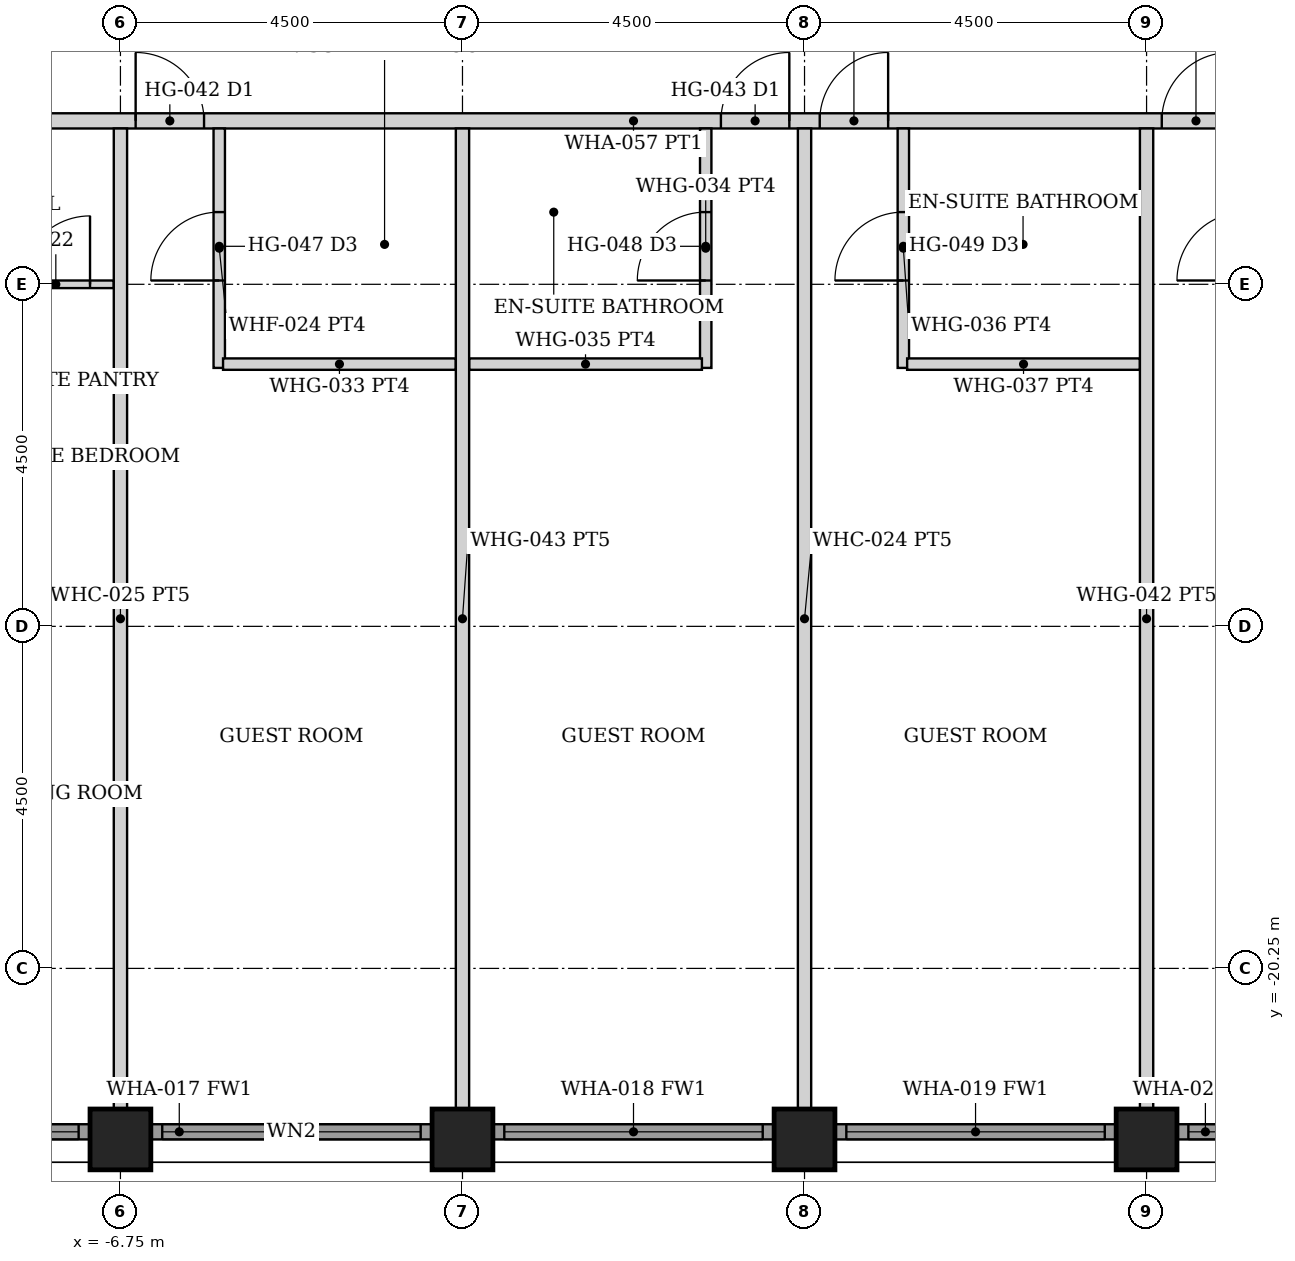
"""IFC4 building model, lengths in metres.
Left out: names, types, materials, properties, quantities, classifications, styles, units other than length and angle.
Written with IfcOpenShell. Run it as: python <this file> out.ifc"""

import sys

from ifc_helpers import new_model, si_unit, direction, frame, frame_2d, origin, origin_2d, place, context, subcontext, project, spatial, rectangle, hollow_rectangle, extrude, element, fill, save


model = new_model("IFC4")
c1 = context("Model", 3, precision=1e-05, world=origin(), true_north=direction((0.0, 1.0)))
c2 = subcontext(c1, "Body", "Model", "MODEL_VIEW")
j1 = project(units=[si_unit("LENGTHUNIT", "METRE"), si_unit("PLANEANGLEUNIT", "RADIAN")], contexts=[c1])
p1 = place(None, origin())
s1 = spatial("IfcSite", under=j1, at=p1, CompositionType="ELEMENT")
p2 = place(p1, origin())
s2 = spatial("IfcBuilding", under=s1, at=p2, CompositionType="ELEMENT")
p3 = place(p2, frame((0.0, 0.0, 183.2)))
s3 = spatial("IfcBuildingStorey", under=s2, at=p3, CompositionType="ELEMENT", Elevation=183.2)
for number, where, z_axis, x_axis in (
    (1, (-6.75, -22.5, 0.0), (0.0, 0.0, 1.0), (0.0, 1.0, 0.0)),
    (2, (-2.25, -22.5, 0.0), (0.0, 0.0, 1.0), (0.0, 1.0, 0.0)),
    (3, (2.25, -22.5, 0.0), (0.0, 0.0, 1.0), (0.0, 1.0, 0.0)),
    (4, (6.75, -22.5, 0.0), (0.0, 0.0, 1.0), (0.0, 1.0, 0.0)),
):
    element("IfcColumn", number, at=place(p3, frame(where, z_axis=z_axis, x_axis=x_axis)), inside=s3, PredefinedType="COLUMN", context=c2, shape_type="SweptSolid", body=[
        extrude(hollow_rectangle(XDim=0.8, YDim=0.8, WallThickness=0.045, at=origin_2d()), origin(), (0.0, 0.0, 1.0), 3.6),
    ])
p4 = place(p3, frame((-10.845, -22.4, 0.0), z_axis=(0.0, 0.0, 1.0), x_axis=(1.0, 0.0, 0.0)))
e5 = element("IfcWall", 5, at=p4, inside=s3, PredefinedType="SOLIDWALL", context=c2, shape_type="SweptSolid", body=[
    extrude(rectangle(XDim=3.69, YDim=0.2, at=frame_2d((1.845, 0.0))), origin(), (0.0, 0.0, 1.0), 2.479),
])
p5 = place(p4, frame((0.145, 0.0, 0.3)))
e6 = element("IfcOpeningElement", 6, at=p5, cuts=e5, PredefinedType="OPENING", context=c2, shape_type="SweptSolid", body=[
    extrude(rectangle(XDim=3.4, YDim=2.029, at=frame_2d((1.7, 1.015))), frame((0.0, 0.11, 0.0), z_axis=(0.0, -1.0, 0.0), x_axis=(1.0, 0.0, 0.0)), (0.0, 0.0, 1.0), 0.22),
])
p6 = place(p3, frame((-6.345, -22.4, 0.0), z_axis=(0.0, 0.0, 1.0), x_axis=(1.0, 0.0, 0.0)))
e7 = element("IfcWall", 7, at=p6, inside=s3, PredefinedType="SOLIDWALL", context=c2, shape_type="SweptSolid", body=[
    extrude(rectangle(XDim=3.69, YDim=0.2, at=frame_2d((1.845, 0.0))), origin(), (0.0, 0.0, 1.0), 2.479),
])
p7 = place(p6, frame((0.145, 0.0, 0.3)))
e8 = element("IfcOpeningElement", 8, at=p7, cuts=e7, PredefinedType="OPENING", context=c2, shape_type="SweptSolid", body=[
    extrude(rectangle(XDim=3.4, YDim=2.029, at=frame_2d((1.7, 1.015))), frame((0.0, 0.11, 0.0), z_axis=(0.0, -1.0, 0.0), x_axis=(1.0, 0.0, 0.0)), (0.0, 0.0, 1.0), 0.22),
])
p8 = place(p3, frame((-1.845, -22.4, 0.0), z_axis=(0.0, 0.0, 1.0), x_axis=(1.0, 0.0, 0.0)))
e9 = element("IfcWall", 9, at=p8, inside=s3, PredefinedType="SOLIDWALL", context=c2, shape_type="SweptSolid", body=[
    extrude(rectangle(XDim=3.69, YDim=0.2, at=frame_2d((1.845, 0.0))), origin(), (0.0, 0.0, 1.0), 2.479),
])
p9 = place(p8, frame((0.145, 0.0, 0.3)))
e10 = element("IfcOpeningElement", 10, at=p9, cuts=e9, PredefinedType="OPENING", context=c2, shape_type="SweptSolid", body=[
    extrude(rectangle(XDim=3.4, YDim=2.029, at=frame_2d((1.7, 1.015))), frame((0.0, 0.11, 0.0), z_axis=(0.0, -1.0, 0.0), x_axis=(1.0, 0.0, 0.0)), (0.0, 0.0, 1.0), 0.22),
])
p10 = place(p3, frame((2.655, -22.4, 0.0), z_axis=(0.0, 0.0, 1.0), x_axis=(1.0, 0.0, 0.0)))
e11 = element("IfcWall", 11, at=p10, inside=s3, PredefinedType="SOLIDWALL", context=c2, shape_type="SweptSolid", body=[
    extrude(rectangle(XDim=3.69, YDim=0.2, at=frame_2d((1.845, 0.0))), origin(), (0.0, 0.0, 1.0), 2.479),
])
p11 = place(p10, frame((0.145, 0.0, 0.3)))
e12 = element("IfcOpeningElement", 12, at=p11, cuts=e11, PredefinedType="OPENING", context=c2, shape_type="SweptSolid", body=[
    extrude(rectangle(XDim=3.4, YDim=2.029, at=frame_2d((1.7, 1.015))), frame((0.0, 0.11, 0.0), z_axis=(0.0, -1.0, 0.0), x_axis=(1.0, 0.0, 0.0)), (0.0, 0.0, 1.0), 0.22),
])
p12 = place(p3, frame((7.155, -22.4, 0.0), z_axis=(0.0, 0.0, 1.0), x_axis=(1.0, 0.0, 0.0)))
e13 = element("IfcWall", 13, at=p12, inside=s3, PredefinedType="SOLIDWALL", context=c2, shape_type="SweptSolid", body=[
    extrude(rectangle(XDim=3.69, YDim=0.2, at=frame_2d((1.845, 0.0))), origin(), (0.0, 0.0, 1.0), 2.479),
])
p13 = place(p12, frame((0.145, 0.0, 0.3)))
e14 = element("IfcOpeningElement", 14, at=p13, cuts=e13, PredefinedType="OPENING", context=c2, shape_type="SweptSolid", body=[
    extrude(rectangle(XDim=3.4, YDim=2.029, at=frame_2d((1.7, 1.015))), frame((0.0, 0.11, 0.0), z_axis=(0.0, -1.0, 0.0), x_axis=(1.0, 0.0, 0.0)), (0.0, 0.0, 1.0), 0.22),
])
p14 = place(p3, frame((-22.3, -9.1, 0.0), z_axis=(0.0, 0.0, 1.0), x_axis=(1.0, 0.0, 0.0)))
e15 = element("IfcWall", 15, at=p14, inside=s3, PredefinedType="PARTITIONING", context=c2, shape_type="SweptSolid", body=[
    extrude(rectangle(XDim=44.6, YDim=0.2, at=frame_2d((22.3, 0.0))), origin(), (0.0, 0.0, 1.0), 2.473),
])
p15 = place(p14, frame((11.35, 0.0, 0.0)))
e16 = element("IfcOpeningElement", 16, at=p15, cuts=e15, PredefinedType="OPENING", context=c2, shape_type="SweptSolid", body=[
    extrude(rectangle(XDim=0.9, YDim=2.1, at=frame_2d((0.45, 1.05))), frame((0.0, 0.11, 0.0), z_axis=(0.0, -1.0, 0.0), x_axis=(1.0, 0.0, 0.0)), (0.0, 0.0, 1.0), 0.22),
])
p16 = place(p14, frame((15.75, 0.0, 0.0)))
e17 = element("IfcOpeningElement", 17, at=p16, cuts=e15, PredefinedType="OPENING", context=c2, shape_type="SweptSolid", body=[
    extrude(rectangle(XDim=0.9, YDim=2.1, at=frame_2d((0.45, 1.05))), frame((0.0, 0.11, 0.0), z_axis=(0.0, -1.0, 0.0), x_axis=(1.0, 0.0, 0.0)), (0.0, 0.0, 1.0), 0.22),
])
p17 = place(p14, frame((23.45, 0.0, 0.0)))
e18 = element("IfcOpeningElement", 18, at=p17, cuts=e15, PredefinedType="OPENING", context=c2, shape_type="SweptSolid", body=[
    extrude(rectangle(XDim=0.9, YDim=2.1, at=frame_2d((0.45, 1.05))), frame((0.0, 0.11, 0.0), z_axis=(0.0, -1.0, 0.0), x_axis=(1.0, 0.0, 0.0)), (0.0, 0.0, 1.0), 0.22),
])
p18 = place(p14, frame((24.75, 0.0, 0.0)))
e19 = element("IfcOpeningElement", 19, at=p18, cuts=e15, PredefinedType="OPENING", context=c2, shape_type="SweptSolid", body=[
    extrude(rectangle(XDim=0.9, YDim=2.1, at=frame_2d((0.45, 1.05))), frame((0.0, 0.11, 0.0), z_axis=(0.0, -1.0, 0.0), x_axis=(1.0, 0.0, 0.0)), (0.0, 0.0, 1.0), 0.22),
])
p19 = place(p14, frame((29.25, 0.0, 0.0)))
e20 = element("IfcOpeningElement", 20, at=p19, cuts=e15, PredefinedType="OPENING", context=c2, shape_type="SweptSolid", body=[
    extrude(rectangle(XDim=0.9, YDim=2.1, at=frame_2d((0.45, 1.05))), frame((0.0, 0.11, 0.0), z_axis=(0.0, -1.0, 0.0), x_axis=(1.0, 0.0, 0.0)), (0.0, 0.0, 1.0), 0.22),
])
p20 = place(p14, frame((38.85, 0.0, 0.0)))
e21 = element("IfcOpeningElement", 21, at=p20, cuts=e15, PredefinedType="OPENING", context=c2, shape_type="SweptSolid", body=[
    extrude(rectangle(XDim=0.9, YDim=2.1, at=frame_2d((0.45, 1.05))), frame((0.0, 0.11, 0.0), z_axis=(0.0, -1.0, 0.0), x_axis=(1.0, 0.0, 0.0)), (0.0, 0.0, 1.0), 0.22),
])
p21 = place(p14, frame((4.85, 0.0, 0.0)))
e22 = element("IfcOpeningElement", 22, at=p21, cuts=e15, PredefinedType="OPENING", context=c2, shape_type="SweptSolid", body=[
    extrude(rectangle(XDim=0.9, YDim=2.1, at=frame_2d((0.45, 1.05))), frame((0.0, 0.11, 0.0), z_axis=(0.0, -1.0, 0.0), x_axis=(1.0, 0.0, 0.0)), (0.0, 0.0, 1.0), 0.22),
])
p22 = place(p3, frame((-15.663, -11.25, 0.0), z_axis=(0.0, 0.0, 1.0), x_axis=(1.0, 0.0, 0.0)))
e23 = element("IfcWall", 23, at=p22, inside=s3, PredefinedType="PARTITIONING", context=c2, shape_type="SweptSolid", body=[
    extrude(rectangle(XDim=8.825, YDim=0.1, at=frame_2d((4.413, 0.0))), origin(), (0.0, 0.0, 1.0), 2.473),
])
p23 = place(p22, frame((5.363, 0.0, 0.0)))
e24 = element("IfcOpeningElement", 24, at=p23, cuts=e23, PredefinedType="OPENING", context=c2, shape_type="SweptSolid", body=[
    extrude(rectangle(XDim=0.9, YDim=2.1, at=frame_2d((0.45, 1.05))), frame((0.0, 0.06, 0.0), z_axis=(0.0, -1.0, 0.0), x_axis=(1.0, 0.0, 0.0)), (0.0, 0.0, 1.0), 0.12),
])
p24 = place(p22, frame((7.613, 0.0, 0.0)))
e25 = element("IfcOpeningElement", 25, at=p24, cuts=e23, PredefinedType="OPENING", context=c2, shape_type="SweptSolid", body=[
    extrude(rectangle(XDim=0.9, YDim=2.1, at=frame_2d((0.45, 1.05))), frame((0.0, 0.06, 0.0), z_axis=(0.0, -1.0, 0.0), x_axis=(1.0, 0.0, 0.0)), (0.0, 0.0, 1.0), 0.12),
])
p25 = place(p22, frame((3.337, 0.0, 0.0)))
e26 = element("IfcOpeningElement", 26, at=p25, cuts=e23, PredefinedType="OPENING", context=c2, shape_type="SweptSolid", body=[
    extrude(rectangle(XDim=0.85, YDim=2.1, at=frame_2d((0.425, 1.05))), frame((0.0, 0.06, 0.0), z_axis=(0.0, -1.0, 0.0), x_axis=(1.0, 0.0, 0.0)), (0.0, 0.0, 1.0), 0.12),
])
p26 = place(p3, frame((-5.45, -12.35, 0.0), z_axis=(0.0, 0.0, 1.0), x_axis=(0.0, 1.0, 0.0)))
e27 = element("IfcWall", 27, at=p26, inside=s3, PredefinedType="PARTITIONING", context=c2, shape_type="SweptSolid", body=[
    extrude(rectangle(XDim=3.15, YDim=0.15, at=frame_2d((1.575, 0.0))), origin(), (0.0, 0.0, 1.0), 2.473),
])
p27 = place(p26, frame((1.15, 0.0, 0.0)))
e28 = element("IfcOpeningElement", 28, at=p27, cuts=e27, PredefinedType="OPENING", context=c2, shape_type="SweptSolid", body=[
    extrude(rectangle(XDim=0.9, YDim=2.1, at=frame_2d((0.45, 1.05))), frame((0.0, 0.085, 0.0), z_axis=(0.0, -1.0, 0.0), x_axis=(1.0, 0.0, 0.0)), (0.0, 0.0, 1.0), 0.17),
])
p28 = place(p3, frame((-5.4, -12.3, 0.0), z_axis=(0.0, 0.0, 1.0), x_axis=(1.0, 0.0, 0.0)))
e29 = element("IfcWall", 29, at=p28, inside=s3, PredefinedType="PARTITIONING", context=c2, shape_type="SweptSolid", body=[
    extrude(rectangle(XDim=3.062, YDim=0.15, at=frame_2d((1.531, 0.0))), origin(), (0.0, 0.0, 1.0), 2.473),
])
p29 = place(p3, frame((0.95, -12.35, 0.0), z_axis=(0.0, 0.0, 1.0), x_axis=(0.0, 1.0, 0.0)))
e30 = element("IfcWall", 30, at=p29, inside=s3, PredefinedType="PARTITIONING", context=c2, shape_type="SweptSolid", body=[
    extrude(rectangle(XDim=3.15, YDim=0.15, at=frame_2d((1.575, 0.0))), origin(), (0.0, 0.0, 1.0), 2.473),
])
p30 = place(p29, frame((1.15, 0.0, 0.0)))
e31 = element("IfcOpeningElement", 31, at=p30, cuts=e30, PredefinedType="OPENING", context=c2, shape_type="SweptSolid", body=[
    extrude(rectangle(XDim=0.9, YDim=2.1, at=frame_2d((0.45, 1.05))), frame((0.0, 0.085, 0.0), z_axis=(0.0, -1.0, 0.0), x_axis=(1.0, 0.0, 0.0)), (0.0, 0.0, 1.0), 0.17),
])
p31 = place(p3, frame((-2.163, -12.3, 0.0), z_axis=(0.0, 0.0, 1.0), x_axis=(1.0, 0.0, 0.0)))
e32 = element("IfcWall", 32, at=p31, inside=s3, PredefinedType="PARTITIONING", context=c2, shape_type="SweptSolid", body=[
    extrude(rectangle(XDim=3.062, YDim=0.15, at=frame_2d((1.531, 0.0))), origin(), (0.0, 0.0, 1.0), 2.473),
])
p32 = place(p3, frame((3.55, -12.35, 0.0), z_axis=(0.0, 0.0, 1.0), x_axis=(0.0, 1.0, 0.0)))
e33 = element("IfcWall", 33, at=p32, inside=s3, PredefinedType="PARTITIONING", context=c2, shape_type="SweptSolid", body=[
    extrude(rectangle(XDim=3.15, YDim=0.15, at=frame_2d((1.575, 0.0))), origin(), (0.0, 0.0, 1.0), 2.473),
])
p33 = place(p32, frame((1.15, 0.0, 0.0)))
e34 = element("IfcOpeningElement", 34, at=p33, cuts=e33, PredefinedType="OPENING", context=c2, shape_type="SweptSolid", body=[
    extrude(rectangle(XDim=0.9, YDim=2.1, at=frame_2d((0.45, 1.05))), frame((0.0, 0.085, 0.0), z_axis=(0.0, -1.0, 0.0), x_axis=(1.0, 0.0, 0.0)), (0.0, 0.0, 1.0), 0.17),
])
p34 = place(p3, frame((3.6, -12.3, 0.0), z_axis=(0.0, 0.0, 1.0), x_axis=(1.0, 0.0, 0.0)))
e35 = element("IfcWall", 35, at=p34, inside=s3, PredefinedType="PARTITIONING", context=c2, shape_type="SweptSolid", body=[
    extrude(rectangle(XDim=3.062, YDim=0.15, at=frame_2d((1.531, 0.0))), origin(), (0.0, 0.0, 1.0), 2.473),
])
for number, where, z_axis, x_axis in (
    (36, (-6.75, -22.1, 0.0), (0.0, 0.0, 1.0), (0.0, 1.0, 0.0)),
    (37, (-2.25, -22.1, 0.0), (0.0, 0.0, 1.0), (0.0, 1.0, 0.0)),
    (38, (2.25, -22.1, 0.0), (0.0, 0.0, 1.0), (0.0, 1.0, 0.0)),
    (39, (6.75, -22.1, 0.0), (0.0, 0.0, 1.0), (0.0, 1.0, 0.0)),
):
    element("IfcWall", number, at=place(p3, frame(where, z_axis=z_axis, x_axis=x_axis)), inside=s3, PredefinedType="PARTITIONING", context=c2, shape_type="SweptSolid", body=[
        extrude(rectangle(XDim=12.9, YDim=0.175, at=frame_2d((6.45, 0.0))), origin(), (0.0, 0.0, 1.0), 2.473),
    ])
p35 = place(p5, origin())
e40 = element("IfcWindow", 40, at=p35, inside=s3, PartitioningType="SINGLE_PANEL", PredefinedType="WINDOW", context=c2, shape_type="SweptSolid", body=[
    extrude(rectangle(XDim=3.4, YDim=2.029, at=frame_2d((1.7, 1.015))), frame((0.0, 0.03, 0.0), z_axis=(0.0, -1.0, 0.0), x_axis=(1.0, 0.0, 0.0)), (0.0, 0.0, 1.0), 0.06),
])
fill(e6, e40)
p36 = place(p7, origin())
e41 = element("IfcWindow", 41, at=p36, inside=s3, PartitioningType="SINGLE_PANEL", PredefinedType="WINDOW", context=c2, shape_type="SweptSolid", body=[
    extrude(rectangle(XDim=3.4, YDim=2.029, at=frame_2d((1.7, 1.015))), frame((0.0, 0.03, 0.0), z_axis=(0.0, -1.0, 0.0), x_axis=(1.0, 0.0, 0.0)), (0.0, 0.0, 1.0), 0.06),
])
fill(e8, e41)
p37 = place(p9, origin())
e42 = element("IfcWindow", 42, at=p37, inside=s3, PartitioningType="SINGLE_PANEL", PredefinedType="WINDOW", context=c2, shape_type="SweptSolid", body=[
    extrude(rectangle(XDim=3.4, YDim=2.029, at=frame_2d((1.7, 1.015))), frame((0.0, 0.03, 0.0), z_axis=(0.0, -1.0, 0.0), x_axis=(1.0, 0.0, 0.0)), (0.0, 0.0, 1.0), 0.06),
])
fill(e10, e42)
p38 = place(p11, origin())
e43 = element("IfcWindow", 43, at=p38, inside=s3, PartitioningType="SINGLE_PANEL", PredefinedType="WINDOW", context=c2, shape_type="SweptSolid", body=[
    extrude(rectangle(XDim=3.4, YDim=2.029, at=frame_2d((1.7, 1.015))), frame((0.0, 0.03, 0.0), z_axis=(0.0, -1.0, 0.0), x_axis=(1.0, 0.0, 0.0)), (0.0, 0.0, 1.0), 0.06),
])
fill(e12, e43)
p39 = place(p13, origin())
e44 = element("IfcWindow", 44, at=p39, inside=s3, PartitioningType="SINGLE_PANEL", PredefinedType="WINDOW", context=c2, shape_type="SweptSolid", body=[
    extrude(rectangle(XDim=3.4, YDim=2.029, at=frame_2d((1.7, 1.015))), frame((0.0, 0.03, 0.0), z_axis=(0.0, -1.0, 0.0), x_axis=(1.0, 0.0, 0.0)), (0.0, 0.0, 1.0), 0.06),
])
fill(e14, e44)
p40 = place(p24, origin())
e45 = element("IfcDoor", 45, at=p40, inside=s3, OperationType="SINGLE_SWING_RIGHT", PredefinedType="DOOR", context=c2, shape_type="SweptSolid", body=[
    extrude(rectangle(XDim=0.9, YDim=2.1, at=frame_2d((0.45, 1.05))), frame((0.0, 0.025, 0.0), z_axis=(0.0, -1.0, 0.0), x_axis=(1.0, 0.0, 0.0)), (0.0, 0.0, 1.0), 0.05),
])
fill(e25, e45)
p41 = place(p16, origin())
e46 = element("IfcDoor", 46, at=p41, inside=s3, OperationType="SINGLE_SWING_LEFT", PredefinedType="DOOR", context=c2, shape_type="SweptSolid", body=[
    extrude(rectangle(XDim=0.9, YDim=2.1, at=frame_2d((0.45, 1.05))), frame((0.0, 0.025, 0.0), z_axis=(0.0, -1.0, 0.0), x_axis=(1.0, 0.0, 0.0)), (0.0, 0.0, 1.0), 0.05),
])
fill(e17, e46)
p42 = place(p27, origin())
e47 = element("IfcDoor", 47, at=p42, inside=s3, OperationType="SINGLE_SWING_LEFT", PredefinedType="DOOR", context=c2, shape_type="SweptSolid", body=[
    extrude(rectangle(XDim=0.9, YDim=2.1, at=frame_2d((0.45, 1.05))), frame((0.0, 0.025, 0.0), z_axis=(0.0, -1.0, 0.0), x_axis=(1.0, 0.0, 0.0)), (0.0, 0.0, 1.0), 0.05),
])
fill(e28, e47)
p43 = place(p17, origin())
e48 = element("IfcDoor", 48, at=p43, inside=s3, OperationType="SINGLE_SWING_RIGHT", PredefinedType="DOOR", context=c2, shape_type="SweptSolid", body=[
    extrude(rectangle(XDim=0.9, YDim=2.1, at=frame_2d((0.45, 1.05))), frame((0.0, 0.025, 0.0), z_axis=(0.0, -1.0, 0.0), x_axis=(1.0, 0.0, 0.0)), (0.0, 0.0, 1.0), 0.05),
])
fill(e18, e48)
p44 = place(p30, origin())
e49 = element("IfcDoor", 49, at=p44, inside=s3, OperationType="SINGLE_SWING_LEFT", PredefinedType="DOOR", context=c2, shape_type="SweptSolid", body=[
    extrude(rectangle(XDim=0.9, YDim=2.1, at=frame_2d((0.45, 1.05))), frame((0.0, 0.025, 0.0), z_axis=(0.0, -1.0, 0.0), x_axis=(1.0, 0.0, 0.0)), (0.0, 0.0, 1.0), 0.05),
])
fill(e31, e49)
p45 = place(p18, origin())
e50 = element("IfcDoor", 50, at=p45, inside=s3, OperationType="SINGLE_SWING_RIGHT", PredefinedType="DOOR", context=c2, shape_type="SweptSolid", body=[
    extrude(rectangle(XDim=0.9, YDim=2.1, at=frame_2d((0.45, 1.05))), frame((0.0, 0.025, 0.0), z_axis=(0.0, -1.0, 0.0), x_axis=(1.0, 0.0, 0.0)), (0.0, 0.0, 1.0), 0.05),
])
fill(e19, e50)
p46 = place(p33, origin())
e51 = element("IfcDoor", 51, at=p46, inside=s3, OperationType="SINGLE_SWING_LEFT", PredefinedType="DOOR", context=c2, shape_type="SweptSolid", body=[
    extrude(rectangle(XDim=0.9, YDim=2.1, at=frame_2d((0.45, 1.05))), frame((0.0, 0.025, 0.0), z_axis=(0.0, -1.0, 0.0), x_axis=(1.0, 0.0, 0.0)), (0.0, 0.0, 1.0), 0.05),
])
fill(e34, e51)
p47 = place(p19, origin())
e52 = element("IfcDoor", 52, at=p47, inside=s3, OperationType="SINGLE_SWING_RIGHT", PredefinedType="DOOR", context=c2, shape_type="SweptSolid", body=[
    extrude(rectangle(XDim=0.9, YDim=2.1, at=frame_2d((0.45, 1.05))), frame((0.0, 0.025, 0.0), z_axis=(0.0, -1.0, 0.0), x_axis=(1.0, 0.0, 0.0)), (0.0, 0.0, 1.0), 0.05),
])
fill(e20, e52)
save(model, sys.argv[1])
